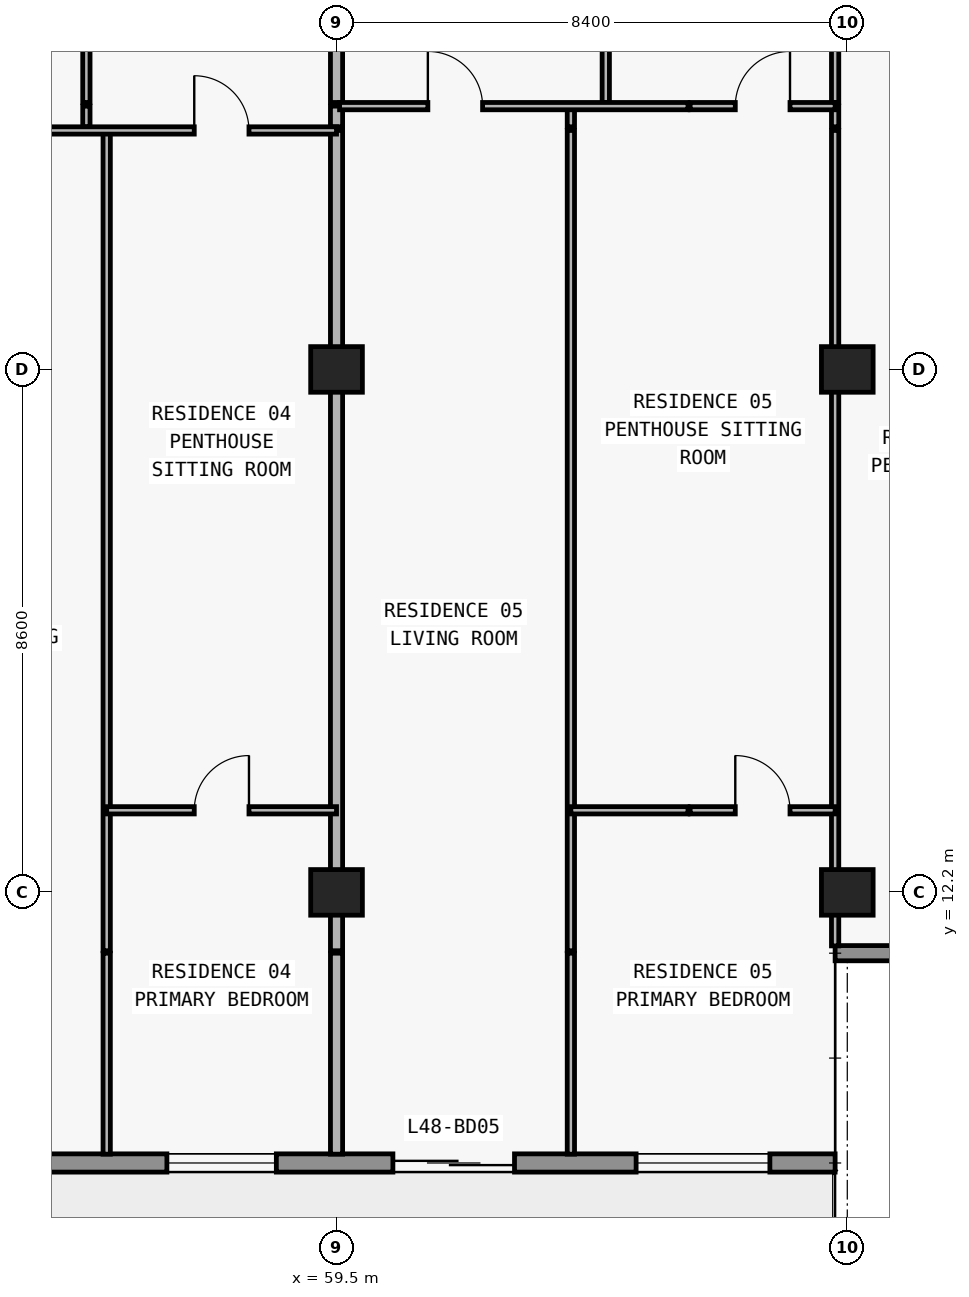
"""IFC4 building model, lengths in metres.
Left out: names, types, materials, properties, quantities, classifications, styles, units other than length and angle.
Written with IfcOpenShell. Run it as: python <this file> out.ifc"""

import sys

from ifc_helpers import new_model, si_unit, direction, frame, frame_2d, origin, origin_2d, place, context, subcontext, project, spatial, rectangle, extrude, element, fill, save


model = new_model("IFC4")
c1 = context("Model", 3, precision=1e-05, world=origin(), true_north=direction((0.0, 1.0)))
c2 = subcontext(c1, "Body", "Model", "MODEL_VIEW")
j1 = project(units=[si_unit("LENGTHUNIT", "METRE"), si_unit("PLANEANGLEUNIT", "RADIAN")], contexts=[c1])
p1 = place(None, origin())
s1 = spatial("IfcSite", under=j1, at=p1, CompositionType="ELEMENT")
p2 = place(p1, origin())
s2 = spatial("IfcBuilding", under=s1, at=p2, CompositionType="ELEMENT")
p3 = place(p2, frame((0.0, 0.0, 173.7)))
s3 = spatial("IfcBuildingStorey", under=s2, at=p3, CompositionType="ELEMENT", Elevation=173.7)
for number, where, z_axis, x_axis in (
    (1, (59.5, 12.2, 0.0), (0.0, 0.0, 1.0), (1.0, 0.0, 0.0)),
    (2, (67.9, 12.2, 0.0), (0.0, 0.0, 1.0), (1.0, 0.0, 0.0)),
    (3, (59.5, 20.8, 0.0), (0.0, 0.0, 1.0), (1.0, 0.0, 0.0)),
    (4, (67.9, 20.8, 0.0), (0.0, 0.0, 1.0), (1.0, 0.0, 0.0)),
):
    element("IfcColumn", number, at=place(p3, frame(where, z_axis=z_axis, x_axis=x_axis)), inside=s3, PredefinedType="COLUMN", context=c2, shape_type="SweptSolid", body=[
        extrude(rectangle(XDim=0.85, YDim=0.75, at=origin_2d()), origin(), (0.0, 0.0, 1.0), 3.05),
    ])
p4 = place(p3, frame((67.7, 7.75, 0.0), z_axis=(0.0, 0.0, 1.0), x_axis=(-1.0, 0.0, 0.0)))
e5 = element("IfcWall", 5, at=p4, inside=s3, PredefinedType="STANDARD", context=c2, shape_type="SweptSolid", body=[
    extrude(rectangle(XDim=57.6, YDim=0.3, at=frame_2d((28.8, 0.0))), origin(), (0.0, 0.0, 1.0), 3.05),
])
p5 = place(p4, frame((54.673, 0.0, 0.0)))
e6 = element("IfcOpeningElement", 6, at=p5, cuts=e5, PredefinedType="OPENING", context=c2, shape_type="SweptSolid", body=[
    extrude(rectangle(XDim=2.0, YDim=2.3, at=frame_2d((1.0, 1.15))), frame((0.0, 0.16, 0.0), z_axis=(0.0, -1.0, 0.0), x_axis=(1.0, 0.0, 0.0)), (0.0, 0.0, 1.0), 0.32),
])
p6 = place(p4, frame((50.473, 0.0, 0.85)))
e7 = element("IfcOpeningElement", 7, at=p6, cuts=e5, PredefinedType="OPENING", context=c2, shape_type="SweptSolid", body=[
    extrude(rectangle(XDim=2.2, YDim=1.55, at=frame_2d((1.1, 0.775))), frame((0.0, 0.16, 0.0), z_axis=(0.0, -1.0, 0.0), x_axis=(1.0, 0.0, 0.0)), (0.0, 0.0, 1.0), 0.32),
])
p7 = place(p4, frame((46.09, 0.0, 0.0)))
e8 = element("IfcOpeningElement", 8, at=p7, cuts=e5, PredefinedType="OPENING", context=c2, shape_type="SweptSolid", body=[
    extrude(rectangle(XDim=2.0, YDim=2.3, at=frame_2d((1.0, 1.15))), frame((0.0, 0.16, 0.0), z_axis=(0.0, -1.0, 0.0), x_axis=(1.0, 0.0, 0.0)), (0.0, 0.0, 1.0), 0.32),
])
p8 = place(p4, frame((41.99, 0.0, 0.85)))
e9 = element("IfcOpeningElement", 9, at=p8, cuts=e5, PredefinedType="OPENING", context=c2, shape_type="SweptSolid", body=[
    extrude(rectangle(XDim=1.8, YDim=1.55, at=frame_2d((0.9, 0.775))), frame((0.0, 0.16, 0.0), z_axis=(0.0, -1.0, 0.0), x_axis=(1.0, 0.0, 0.0)), (0.0, 0.0, 1.0), 0.32),
])
p9 = place(p4, frame((38.09, 0.0, 0.0)))
e10 = element("IfcOpeningElement", 10, at=p9, cuts=e5, PredefinedType="OPENING", context=c2, shape_type="SweptSolid", body=[
    extrude(rectangle(XDim=2.0, YDim=2.3, at=frame_2d((1.0, 1.15))), frame((0.0, 0.16, 0.0), z_axis=(0.0, -1.0, 0.0), x_axis=(1.0, 0.0, 0.0)), (0.0, 0.0, 1.0), 0.32),
])
p10 = place(p4, frame((33.41, 0.0, 0.65)))
e11 = element("IfcOpeningElement", 11, at=p10, cuts=e5, PredefinedType="OPENING", context=c2, shape_type="SweptSolid", body=[
    extrude(rectangle(XDim=2.6, YDim=1.85, at=frame_2d((1.3, 0.925))), frame((0.0, 0.16, 0.0), z_axis=(0.0, -1.0, 0.0), x_axis=(1.0, 0.0, 0.0)), (0.0, 0.0, 1.0), 0.32),
])
p11 = place(p4, frame((27.7, 0.0, 0.85)))
e12 = element("IfcOpeningElement", 12, at=p11, cuts=e5, PredefinedType="OPENING", context=c2, shape_type="SweptSolid", body=[
    extrude(rectangle(XDim=2.2, YDim=1.55, at=frame_2d((1.1, 0.775))), frame((0.0, 0.16, 0.0), z_axis=(0.0, -1.0, 0.0), x_axis=(1.0, 0.0, 0.0)), (0.0, 0.0, 1.0), 0.32),
])
p12 = place(p4, frame((19.7, 0.0, 0.85)))
e13 = element("IfcOpeningElement", 13, at=p12, cuts=e5, PredefinedType="OPENING", context=c2, shape_type="SweptSolid", body=[
    extrude(rectangle(XDim=2.2, YDim=1.55, at=frame_2d((1.1, 0.775))), frame((0.0, 0.16, 0.0), z_axis=(0.0, -1.0, 0.0), x_axis=(1.0, 0.0, 0.0)), (0.0, 0.0, 1.0), 0.32),
])
p13 = place(p4, frame((13.29, 0.0, 0.0)))
e14 = element("IfcOpeningElement", 14, at=p13, cuts=e5, PredefinedType="OPENING", context=c2, shape_type="SweptSolid", body=[
    extrude(rectangle(XDim=2.0, YDim=2.3, at=frame_2d((1.0, 1.15))), frame((0.0, 0.16, 0.0), z_axis=(0.0, -1.0, 0.0), x_axis=(1.0, 0.0, 0.0)), (0.0, 0.0, 1.0), 0.32),
])
p14 = place(p4, frame((9.19, 0.0, 0.85)))
e15 = element("IfcOpeningElement", 15, at=p14, cuts=e5, PredefinedType="OPENING", context=c2, shape_type="SweptSolid", body=[
    extrude(rectangle(XDim=1.8, YDim=1.55, at=frame_2d((0.9, 0.775))), frame((0.0, 0.16, 0.0), z_axis=(0.0, -1.0, 0.0), x_axis=(1.0, 0.0, 0.0)), (0.0, 0.0, 1.0), 0.32),
])
p15 = place(p4, frame((5.273, 0.0, 0.0)))
e16 = element("IfcOpeningElement", 16, at=p15, cuts=e5, PredefinedType="OPENING", context=c2, shape_type="SweptSolid", body=[
    extrude(rectangle(XDim=2.0, YDim=2.3, at=frame_2d((1.0, 1.15))), frame((0.0, 0.16, 0.0), z_axis=(0.0, -1.0, 0.0), x_axis=(1.0, 0.0, 0.0)), (0.0, 0.0, 1.0), 0.32),
])
p16 = place(p4, frame((1.073, 0.0, 0.85)))
e17 = element("IfcOpeningElement", 17, at=p16, cuts=e5, PredefinedType="OPENING", context=c2, shape_type="SweptSolid", body=[
    extrude(rectangle(XDim=2.2, YDim=1.55, at=frame_2d((1.1, 0.775))), frame((0.0, 0.16, 0.0), z_axis=(0.0, -1.0, 0.0), x_axis=(1.0, 0.0, 0.0)), (0.0, 0.0, 1.0), 0.32),
])
p17 = place(p3, frame((67.7, 11.2, 0.0), z_axis=(0.0, 0.0, 1.0), x_axis=(1.0, 0.0, 0.0)))
e18 = element("IfcWall", 18, at=p17, inside=s3, PredefinedType="ELEMENTEDWALL", context=c2, shape_type="SweptSolid", body=[
    extrude(rectangle(XDim=3.85, YDim=0.25, at=frame_2d((1.925, 0.0))), origin(), (0.0, 0.0, 1.0), 3.05),
])
p18 = place(p3, frame((55.386, 24.79, 0.0), z_axis=(0.0, 0.0, 1.0), x_axis=(0.0, 1.0, 0.0)))
e19 = element("IfcWall", 19, at=p18, inside=s3, PredefinedType="PARTITIONING", context=c2, shape_type="SweptSolid", body=[
    extrude(rectangle(XDim=0.34, YDim=0.12, at=frame_2d((0.17, 0.0))), origin(), (0.0, 0.0, 1.0), 3.05),
])
p19 = place(p3, frame((55.386, 25.19, 0.0), z_axis=(0.0, 0.0, 1.0), x_axis=(0.0, 1.0, 0.0)))
e20 = element("IfcWall", 20, at=p19, inside=s3, PredefinedType="PARTITIONING", context=c2, shape_type="SweptSolid", body=[
    extrude(rectangle(XDim=4.69, YDim=0.12, at=frame_2d((2.345, 0.0))), origin(), (0.0, 0.0, 1.0), 2.725),
])
p20 = place(p19, frame((1.895, 0.0, 0.0)))
e21 = element("IfcOpeningElement", 21, at=p20, cuts=e20, PredefinedType="OPENING", context=c2, shape_type="SweptSolid", body=[
    extrude(rectangle(XDim=0.9, YDim=2.15, at=frame_2d((0.45, 1.075))), frame((0.0, 0.07, 0.0), z_axis=(0.0, -1.0, 0.0), x_axis=(1.0, 0.0, 0.0)), (0.0, 0.0, 1.0), 0.14),
])
p21 = place(p3, frame((55.72, 7.895, 0.0), z_axis=(0.0, 0.0, 1.0), x_axis=(0.0, 1.0, 0.0)))
e22 = element("IfcWall", 22, at=p21, inside=s3, PredefinedType="PARTITIONING", context=c2, shape_type="SweptSolid", body=[
    extrude(rectangle(XDim=3.305, YDim=0.12, at=frame_2d((1.652, 0.0))), origin(), (0.0, 0.0, 1.0), 3.05),
])
p22 = place(p3, frame((55.72, 11.24, 0.0), z_axis=(0.0, 0.0, 1.0), x_axis=(0.0, 1.0, 0.0)))
e23 = element("IfcWall", 23, at=p22, inside=s3, PredefinedType="PARTITIONING", context=c2, shape_type="SweptSolid", body=[
    extrude(rectangle(XDim=13.49, YDim=0.12, at=frame_2d((6.745, 0.0))), origin(), (0.0, 0.0, 1.0), 3.05),
])
p23 = place(p3, frame((59.5, 7.895, 0.0), z_axis=(0.0, 0.0, 1.0), x_axis=(0.0, 1.0, 0.0)))
e24 = element("IfcWall", 24, at=p23, inside=s3, PredefinedType="PARTITIONING", context=c2, shape_type="SweptSolid", body=[
    extrude(rectangle(XDim=3.305, YDim=0.2, at=frame_2d((1.652, 0.0))), origin(), (0.0, 0.0, 1.0), 3.05),
])
p24 = place(p3, frame((59.5, 11.24, 0.0), z_axis=(0.0, 0.0, 1.0), x_axis=(0.0, 1.0, 0.0)))
e25 = element("IfcWall", 25, at=p24, inside=s3, PredefinedType="PARTITIONING", context=c2, shape_type="SweptSolid", body=[
    extrude(rectangle(XDim=13.49, YDim=0.2, at=frame_2d((6.745, 0.0))), origin(), (0.0, 0.0, 1.0), 2.263),
])
p25 = place(p3, frame((59.5, 24.79, 0.0), z_axis=(0.0, 0.0, 1.0), x_axis=(0.0, 1.0, 0.0)))
e26 = element("IfcWall", 26, at=p25, inside=s3, PredefinedType="PARTITIONING", context=c2, shape_type="SweptSolid", body=[
    extrude(rectangle(XDim=0.34, YDim=0.2, at=frame_2d((0.17, 0.0))), origin(), (0.0, 0.0, 1.0), 2.263),
])
p26 = place(p3, frame((59.5, 25.19, 0.0), z_axis=(0.0, 0.0, 1.0), x_axis=(0.0, 1.0, 0.0)))
e27 = element("IfcWall", 27, at=p26, inside=s3, PredefinedType="PARTITIONING", context=c2, shape_type="SweptSolid", body=[
    extrude(rectangle(XDim=4.69, YDim=0.2, at=frame_2d((2.345, 0.0))), origin(), (0.0, 0.0, 1.0), 2.263),
])
p27 = place(p3, frame((63.354, 7.895, 0.0), z_axis=(0.0, 0.0, 1.0), x_axis=(0.0, 1.0, 0.0)))
e28 = element("IfcWall", 28, at=p27, inside=s3, PredefinedType="PARTITIONING", context=c2, shape_type="SweptSolid", body=[
    extrude(rectangle(XDim=3.305, YDim=0.12, at=frame_2d((1.652, 0.0))), origin(), (0.0, 0.0, 1.0), 3.05),
])
p28 = place(p3, frame((63.354, 11.24, 0.0), z_axis=(0.0, 0.0, 1.0), x_axis=(0.0, 1.0, 0.0)))
e29 = element("IfcWall", 29, at=p28, inside=s3, PredefinedType="PARTITIONING", context=c2, shape_type="SweptSolid", body=[
    extrude(rectangle(XDim=13.49, YDim=0.12, at=frame_2d((6.745, 0.0))), origin(), (0.0, 0.0, 1.0), 3.05),
])
p29 = place(p3, frame((63.354, 24.79, 0.0), z_axis=(0.0, 0.0, 1.0), x_axis=(0.0, 1.0, 0.0)))
e30 = element("IfcWall", 30, at=p29, inside=s3, PredefinedType="PARTITIONING", context=c2, shape_type="SweptSolid", body=[
    extrude(rectangle(XDim=0.34, YDim=0.12, at=frame_2d((0.17, 0.0))), origin(), (0.0, 0.0, 1.0), 3.05),
])
p30 = place(p3, frame((63.928, 25.19, 0.0), z_axis=(0.0, 0.0, 1.0), x_axis=(0.0, 1.0, 0.0)))
e31 = element("IfcWall", 31, at=p30, inside=s3, PredefinedType="PARTITIONING", context=c2, shape_type="SweptSolid", body=[
    extrude(rectangle(XDim=4.69, YDim=0.12, at=frame_2d((2.345, 0.0))), origin(), (0.0, 0.0, 1.0), 3.05),
])
p31 = place(p30, frame((1.895, 0.0, 0.0)))
e32 = element("IfcOpeningElement", 32, at=p31, cuts=e31, PredefinedType="OPENING", context=c2, shape_type="SweptSolid", body=[
    extrude(rectangle(XDim=0.9, YDim=2.15, at=frame_2d((0.45, 1.075))), frame((0.0, 0.07, 0.0), z_axis=(0.0, -1.0, 0.0), x_axis=(1.0, 0.0, 0.0)), (0.0, 0.0, 1.0), 0.14),
])
p32 = place(p3, frame((67.7, 11.32, 0.0), z_axis=(0.0, 0.0, 1.0), x_axis=(0.0, 1.0, 0.0)))
e33 = element("IfcWall", 33, at=p32, inside=s3, PredefinedType="PARTITIONING", context=c2, shape_type="SweptSolid", body=[
    extrude(rectangle(XDim=13.41, YDim=0.12, at=frame_2d((6.705, 0.0))), origin(), (0.0, 0.0, 1.0), 2.263),
])
p33 = place(p3, frame((67.7, 24.79, 0.0), z_axis=(0.0, 0.0, 1.0), x_axis=(0.0, 1.0, 0.0)))
e34 = element("IfcWall", 34, at=p33, inside=s3, PredefinedType="PARTITIONING", context=c2, shape_type="SweptSolid", body=[
    extrude(rectangle(XDim=0.34, YDim=0.12, at=frame_2d((0.17, 0.0))), origin(), (0.0, 0.0, 1.0), 2.263),
])
p34 = place(p3, frame((67.7, 25.19, 0.0), z_axis=(0.0, 0.0, 1.0), x_axis=(0.0, 1.0, 0.0)))
e35 = element("IfcWall", 35, at=p34, inside=s3, PredefinedType="PARTITIONING", context=c2, shape_type="SweptSolid", body=[
    extrude(rectangle(XDim=4.69, YDim=0.12, at=frame_2d((2.345, 0.0))), origin(), (0.0, 0.0, 1.0), 2.263),
])
p35 = place(p34, frame((1.895, 0.0, 0.0)))
e36 = element("IfcOpeningElement", 36, at=p35, cuts=e35, PredefinedType="OPENING", context=c2, shape_type="SweptSolid", body=[
    extrude(rectangle(XDim=0.9, YDim=2.15, at=frame_2d((0.45, 1.075))), frame((0.0, 0.07, 0.0), z_axis=(0.0, -1.0, 0.0), x_axis=(1.0, 0.0, 0.0)), (0.0, 0.0, 1.0), 0.14),
])
p36 = place(p3, frame((55.72, 13.55, 0.0), z_axis=(0.0, 0.0, 1.0), x_axis=(1.0, 0.0, 0.0)))
e37 = element("IfcWall", 37, at=p36, inside=s3, PredefinedType="PARTITIONING", context=c2, shape_type="SweptSolid", body=[
    extrude(rectangle(XDim=3.78, YDim=0.12, at=frame_2d((1.89, 0.0))), origin(), (0.0, 0.0, 1.0), 3.05),
])
p37 = place(p36, frame((1.44, 0.0, 0.0)))
e38 = element("IfcOpeningElement", 38, at=p37, cuts=e37, PredefinedType="OPENING", context=c2, shape_type="SweptSolid", body=[
    extrude(rectangle(XDim=0.9, YDim=2.15, at=frame_2d((0.45, 1.075))), frame((0.0, 0.07, 0.0), z_axis=(0.0, -1.0, 0.0), x_axis=(1.0, 0.0, 0.0)), (0.0, 0.0, 1.0), 0.14),
])
p38 = place(p3, frame((63.354, 13.55, 0.0), z_axis=(0.0, 0.0, 1.0), x_axis=(1.0, 0.0, 0.0)))
e39 = element("IfcWall", 39, at=p38, inside=s3, PredefinedType="PARTITIONING", context=c2, shape_type="SweptSolid", body=[
    extrude(rectangle(XDim=1.926, YDim=0.12, at=frame_2d((0.963, 0.0))), origin(), (0.0, 0.0, 1.0), 3.05),
])
p39 = place(p3, frame((65.316, 13.55, 0.0), z_axis=(0.0, 0.0, 1.0), x_axis=(1.0, 0.0, 0.0)))
e40 = element("IfcWall", 40, at=p39, inside=s3, PredefinedType="PARTITIONING", context=c2, shape_type="SweptSolid", body=[
    extrude(rectangle(XDim=2.384, YDim=0.12, at=frame_2d((1.192, 0.0))), origin(), (0.0, 0.0, 1.0), 3.05),
])
p40 = place(p39, frame((0.742, 0.0, 0.0)))
e41 = element("IfcOpeningElement", 41, at=p40, cuts=e40, PredefinedType="OPENING", context=c2, shape_type="SweptSolid", body=[
    extrude(rectangle(XDim=0.9, YDim=2.15, at=frame_2d((0.45, 1.075))), frame((0.0, 0.07, 0.0), z_axis=(0.0, -1.0, 0.0), x_axis=(1.0, 0.0, 0.0)), (0.0, 0.0, 1.0), 0.14),
])
p41 = place(p3, frame((51.32, 24.73, 0.0), z_axis=(0.0, 0.0, 1.0), x_axis=(1.0, 0.0, 0.0)))
e42 = element("IfcWall", 42, at=p41, inside=s3, PredefinedType="PARTITIONING", context=c2, shape_type="SweptSolid", body=[
    extrude(rectangle(XDim=8.18, YDim=0.12, at=frame_2d((4.09, 0.0))), origin(), (0.0, 0.0, 1.0), 3.05),
])
p42 = place(p41, frame((1.583, 0.0, 0.0)))
e43 = element("IfcOpeningElement", 43, at=p42, cuts=e42, PredefinedType="OPENING", context=c2, shape_type="SweptSolid", body=[
    extrude(rectangle(XDim=0.9, YDim=2.15, at=frame_2d((0.45, 1.075))), frame((0.0, 0.07, 0.0), z_axis=(0.0, -1.0, 0.0), x_axis=(1.0, 0.0, 0.0)), (0.0, 0.0, 1.0), 0.14),
])
p43 = place(p41, frame((5.84, 0.0, 0.0)))
e44 = element("IfcOpeningElement", 44, at=p43, cuts=e42, PredefinedType="OPENING", context=c2, shape_type="SweptSolid", body=[
    extrude(rectangle(XDim=0.9, YDim=2.15, at=frame_2d((0.45, 1.075))), frame((0.0, 0.07, 0.0), z_axis=(0.0, -1.0, 0.0), x_axis=(1.0, 0.0, 0.0)), (0.0, 0.0, 1.0), 0.14),
])
p44 = place(p3, frame((59.55, 25.13, 0.0), z_axis=(0.0, 0.0, 1.0), x_axis=(1.0, 0.0, 0.0)))
e45 = element("IfcWall", 45, at=p44, inside=s3, PredefinedType="PARTITIONING", context=c2, shape_type="SweptSolid", body=[
    extrude(rectangle(XDim=5.73, YDim=0.12, at=frame_2d((2.865, 0.0))), origin(), (0.0, 0.0, 1.0), 3.05),
])
p45 = place(p44, frame((1.452, 0.0, 0.0)))
e46 = element("IfcOpeningElement", 46, at=p45, cuts=e45, PredefinedType="OPENING", context=c2, shape_type="SweptSolid", body=[
    extrude(rectangle(XDim=0.9, YDim=2.15, at=frame_2d((0.45, 1.075))), frame((0.0, 0.07, 0.0), z_axis=(0.0, -1.0, 0.0), x_axis=(1.0, 0.0, 0.0)), (0.0, 0.0, 1.0), 0.14),
])
p46 = place(p3, frame((65.316, 25.13, 0.0), z_axis=(0.0, 0.0, 1.0), x_axis=(1.0, 0.0, 0.0)))
e47 = element("IfcWall", 47, at=p46, inside=s3, PredefinedType="PARTITIONING", context=c2, shape_type="SweptSolid", body=[
    extrude(rectangle(XDim=2.384, YDim=0.12, at=frame_2d((1.192, 0.0))), origin(), (0.0, 0.0, 1.0), 3.05),
])
p47 = place(p46, frame((0.742, 0.0, 0.0)))
e48 = element("IfcOpeningElement", 48, at=p47, cuts=e47, PredefinedType="OPENING", context=c2, shape_type="SweptSolid", body=[
    extrude(rectangle(XDim=0.9, YDim=2.15, at=frame_2d((0.45, 1.075))), frame((0.0, 0.07, 0.0), z_axis=(0.0, -1.0, 0.0), x_axis=(1.0, 0.0, 0.0)), (0.0, 0.0, 1.0), 0.14),
])
p48 = place(p14, origin())
e49 = element("IfcWindow", 49, at=p48, inside=s3, PartitioningType="SINGLE_PANEL", PredefinedType="WINDOW", context=c2, shape_type="SweptSolid", body=[
    extrude(rectangle(XDim=1.8, YDim=1.55, at=frame_2d((0.9, 0.775))), frame((0.0, 0.03, 0.0), z_axis=(0.0, -1.0, 0.0), x_axis=(1.0, 0.0, 0.0)), (0.0, 0.0, 1.0), 0.06),
])
fill(e15, e49)
p49 = place(p15, origin())
e50 = element("IfcDoor", 50, at=p49, inside=s3, OperationType="DOUBLE_DOOR_SLIDING", PredefinedType="DOOR", context=c2, shape_type="SweptSolid", body=[
    extrude(rectangle(XDim=2.0, YDim=2.3, at=frame_2d((1.0, 1.15))), frame((0.0, 0.025, 0.0), z_axis=(0.0, -1.0, 0.0), x_axis=(1.0, 0.0, 0.0)), (0.0, 0.0, 1.0), 0.05),
])
fill(e16, e50)
p50 = place(p16, origin())
e51 = element("IfcWindow", 51, at=p50, inside=s3, PartitioningType="SINGLE_PANEL", PredefinedType="WINDOW", context=c2, shape_type="SweptSolid", body=[
    extrude(rectangle(XDim=2.2, YDim=1.55, at=frame_2d((1.1, 0.775))), frame((0.0, 0.03, 0.0), z_axis=(0.0, -1.0, 0.0), x_axis=(1.0, 0.0, 0.0)), (0.0, 0.0, 1.0), 0.06),
])
fill(e17, e51)
p51 = place(p43, origin())
e52 = element("IfcDoor", 52, at=p51, inside=s3, OperationType="SINGLE_SWING_LEFT", PredefinedType="DOOR", context=c2, shape_type="SweptSolid", body=[
    extrude(rectangle(XDim=0.9, YDim=2.15, at=frame_2d((0.45, 1.075))), frame((0.0, 0.025, 0.0), z_axis=(0.0, -1.0, 0.0), x_axis=(1.0, 0.0, 0.0)), (0.0, 0.0, 1.0), 0.05),
])
fill(e44, e52)
p52 = place(p37, origin())
e53 = element("IfcDoor", 53, at=p52, inside=s3, OperationType="SINGLE_SWING_RIGHT", PredefinedType="DOOR", context=c2, shape_type="SweptSolid", body=[
    extrude(rectangle(XDim=0.9, YDim=2.15, at=frame_2d((0.45, 1.075))), frame((0.0, 0.025, 0.0), z_axis=(0.0, -1.0, 0.0), x_axis=(1.0, 0.0, 0.0)), (0.0, 0.0, 1.0), 0.05),
])
fill(e38, e53)
p53 = place(p45, origin())
e54 = element("IfcDoor", 54, at=p53, inside=s3, OperationType="SINGLE_SWING_LEFT", PredefinedType="DOOR", context=c2, shape_type="SweptSolid", body=[
    extrude(rectangle(XDim=0.9, YDim=2.15, at=frame_2d((0.45, 1.075))), frame((0.0, 0.025, 0.0), z_axis=(0.0, -1.0, 0.0), x_axis=(1.0, 0.0, 0.0)), (0.0, 0.0, 1.0), 0.05),
])
fill(e46, e54)
p54 = place(p47, origin())
e55 = element("IfcDoor", 55, at=p54, inside=s3, OperationType="SINGLE_SWING_RIGHT", PredefinedType="DOOR", context=c2, shape_type="SweptSolid", body=[
    extrude(rectangle(XDim=0.9, YDim=2.15, at=frame_2d((0.45, 1.075))), frame((0.0, 0.025, 0.0), z_axis=(0.0, -1.0, 0.0), x_axis=(1.0, 0.0, 0.0)), (0.0, 0.0, 1.0), 0.05),
])
fill(e48, e55)
p55 = place(p40, origin())
e56 = element("IfcDoor", 56, at=p55, inside=s3, OperationType="SINGLE_SWING_LEFT", PredefinedType="DOOR", context=c2, shape_type="SweptSolid", body=[
    extrude(rectangle(XDim=0.9, YDim=2.15, at=frame_2d((0.45, 1.075))), frame((0.0, 0.025, 0.0), z_axis=(0.0, -1.0, 0.0), x_axis=(1.0, 0.0, 0.0)), (0.0, 0.0, 1.0), 0.05),
])
fill(e41, e56)
save(model, sys.argv[1])
